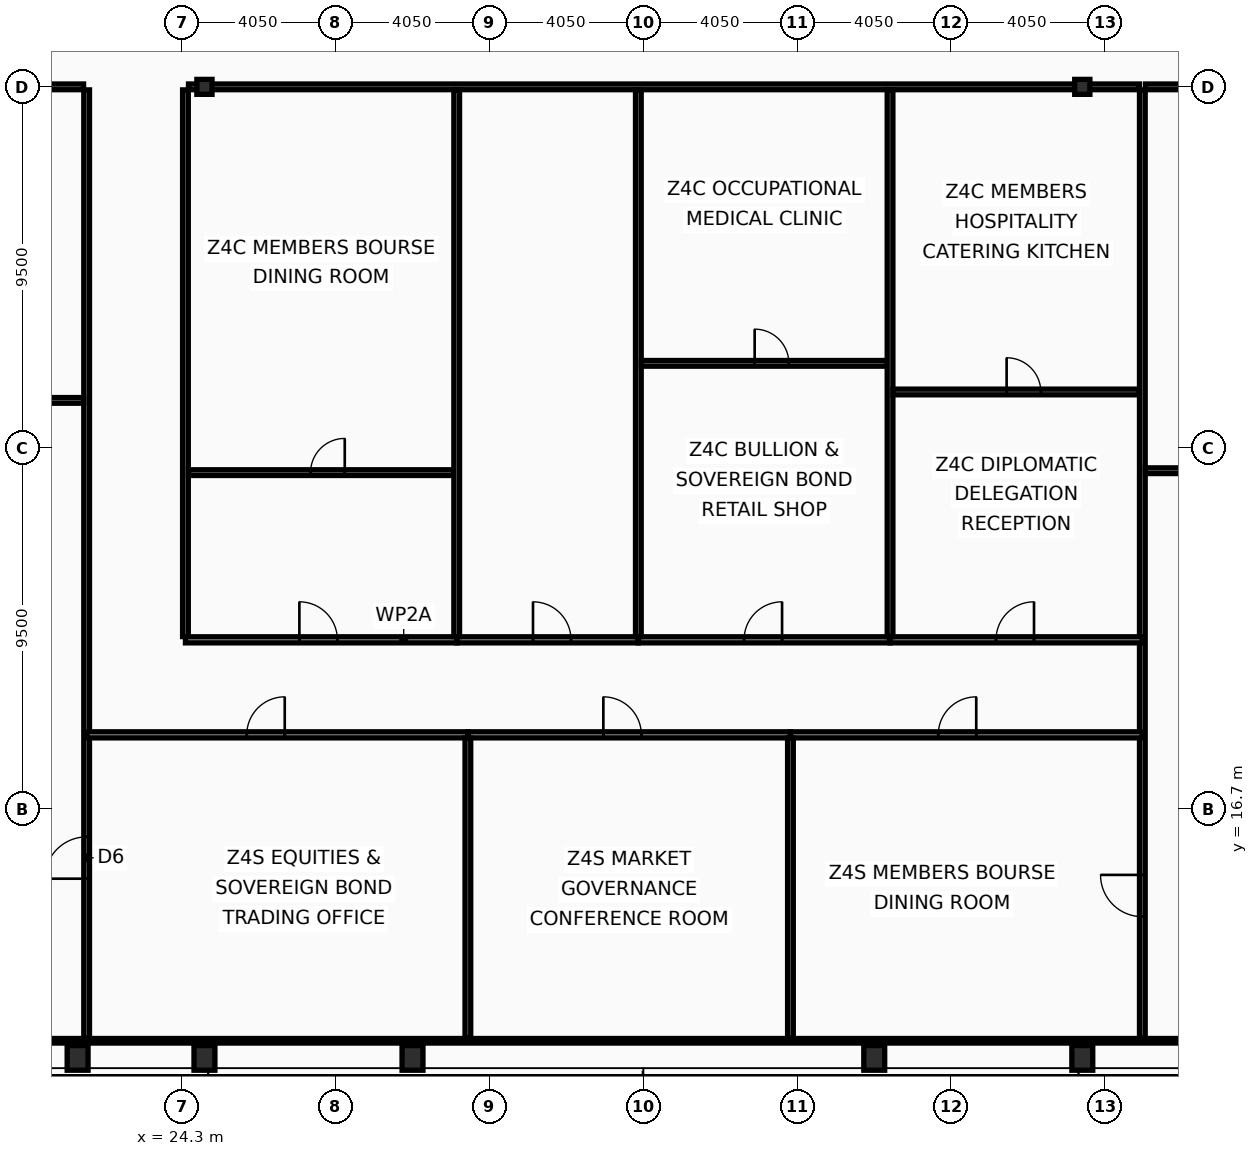
"""IFC4 building model, lengths in metres.
Left out: names, types, materials, properties, quantities, classifications, styles, units other than length and angle.
Written with IfcOpenShell. Run it as: python <this file> out.ifc"""

import sys

from ifc_helpers import new_model, si_unit, direction, frame, frame_2d, origin, origin_2d, place, context, subcontext, project, spatial, rectangle, hollow_rectangle, i_section, extrude, element, fill, save


model = new_model("IFC4")
c1 = context("Model", 3, precision=1e-05, world=origin(), true_north=direction((0.0, 1.0)))
c2 = subcontext(c1, "Body", "Model", "MODEL_VIEW")
j1 = project(units=[si_unit("LENGTHUNIT", "METRE"), si_unit("PLANEANGLEUNIT", "RADIAN")], contexts=[c1])
p1 = place(None, origin())
s1 = spatial("IfcSite", under=j1, at=p1, CompositionType="ELEMENT")
p2 = place(p1, origin())
s2 = spatial("IfcBuilding", under=s1, at=p2, CompositionType="ELEMENT")
p3 = place(p2, frame((0.0, 0.0, 295.0)))
s3 = spatial("IfcBuildingStorey", under=s2, at=p3, CompositionType="ELEMENT", Elevation=295.0)
for number, where, z_axis, x_axis in (
    (1, (21.562, 10.15, 0.0), (0.0, 0.0, 1.0), (1.0, 0.0, 0.0)),
    (2, (24.9, 10.15, 0.0), (0.0, 0.0, 1.0), (1.0, 0.0, 0.0)),
    (3, (30.375, 10.15, 0.0), (0.0, 0.0, 1.0), (1.0, 0.0, 0.0)),
    (4, (42.525, 10.15, 0.0), (0.0, 0.0, 1.0), (1.0, 0.0, 0.0)),
    (5, (48.0, 10.15, 0.0), (0.0, 0.0, 1.0), (1.0, 0.0, 0.0)),
):
    element("IfcColumn", number, at=place(p3, frame(where, z_axis=z_axis, x_axis=x_axis)), inside=s3, PredefinedType="COLUMN", context=c2, shape_type="SweptSolid", body=[
        extrude(hollow_rectangle(XDim=0.55, YDim=0.65, WallThickness=0.04, at=origin_2d()), origin(), (0.0, 0.0, 1.0), 3.6),
    ])
for number, where, z_axis, x_axis in (
    (6, (24.9, 35.7, 0.0), (0.0, 0.0, 1.0), (1.0, 0.0, 0.0)),
    (7, (48.0, 35.7, 0.0), (0.0, 0.0, 1.0), (1.0, 0.0, 0.0)),
):
    element("IfcColumn", number, at=place(p3, frame(where, z_axis=z_axis, x_axis=x_axis)), inside=s3, PredefinedType="COLUMN", context=c2, shape_type="SweptSolid", body=[
        extrude(i_section(OverallWidth=0.399, OverallDepth=0.393, WebThickness=0.023, FlangeThickness=0.037, at=origin_2d()), origin(), (0.0, 0.0, 1.0), 3.6),
    ])
p4 = place(p3, frame((21.8, 10.665, 0.0), z_axis=(0.0, 0.0, 1.0), x_axis=(0.0, 1.0, 0.0)))
e8 = element("IfcWall", 8, at=p4, inside=s3, PredefinedType="PARTITIONING", context=c2, shape_type="SweptSolid", body=[
    extrude(rectangle(XDim=24.955, YDim=0.15, at=frame_2d((12.478, 0.0))), origin(), (0.0, 0.0, 1.0), 3.03),
])
p5 = place(p4, frame((4.2, 0.0, 0.0)))
e9 = element("IfcOpeningElement", 9, at=p5, cuts=e8, PredefinedType="OPENING", context=c2, shape_type="SweptSolid", body=[
    extrude(rectangle(XDim=1.1, YDim=2.1, at=frame_2d((0.55, 1.05))), frame((0.0, 0.085, 0.0), z_axis=(0.0, -1.0, 0.0), x_axis=(1.0, 0.0, 0.0)), (0.0, 0.0, 1.0), 0.17),
])
p6 = place(p3, frame((12.095, 35.7, 0.0), z_axis=(0.0, 0.0, 1.0), x_axis=(1.0, 0.0, 0.0)))
e10 = element("IfcWall", 10, at=p6, inside=s3, PredefinedType="PARTITIONING", context=c2, shape_type="SweptSolid", body=[
    extrude(rectangle(XDim=9.625, YDim=0.15, at=frame_2d((4.812, 0.0))), origin(), (0.0, 0.0, 1.0), 2.78),
])
p7 = place(p6, frame((2.8, 0.0, 0.0)))
e11 = element("IfcOpeningElement", 11, at=p7, cuts=e10, PredefinedType="OPENING", context=c2, shape_type="SweptSolid", body=[
    extrude(rectangle(XDim=1.0, YDim=2.05, at=frame_2d((0.5, 1.025))), frame((0.0, 0.085, 0.0), z_axis=(0.0, -1.0, 0.0), x_axis=(1.0, 0.0, 0.0)), (0.0, 0.0, 1.0), 0.17),
])
p8 = place(p3, frame((12.095, 27.45, 0.0), z_axis=(0.0, 0.0, 1.0), x_axis=(1.0, 0.0, 0.0)))
e12 = element("IfcWall", 12, at=p8, inside=s3, PredefinedType="PARTITIONING", context=c2, shape_type="SweptSolid", body=[
    extrude(rectangle(XDim=9.625, YDim=0.15, at=frame_2d((4.812, 0.0))), origin(), (0.0, 0.0, 1.0), 2.78),
])
p9 = place(p8, frame((2.2, 0.0, 0.0)))
e13 = element("IfcOpeningElement", 13, at=p9, cuts=e12, PredefinedType="OPENING", context=c2, shape_type="SweptSolid", body=[
    extrude(rectangle(XDim=0.9, YDim=2.05, at=frame_2d((0.45, 1.025))), frame((0.0, 0.085, 0.0), z_axis=(0.0, -1.0, 0.0), x_axis=(1.0, 0.0, 0.0)), (0.0, 0.0, 1.0), 0.17),
])
p10 = place(p3, frame((24.4, 21.235, 0.0), z_axis=(0.0, 0.0, 1.0), x_axis=(0.0, 1.0, 0.0)))
e14 = element("IfcWall", 14, at=p10, inside=s3, PredefinedType="PARTITIONING", context=c2, shape_type="SweptSolid", body=[
    extrude(rectangle(XDim=14.385, YDim=0.15, at=frame_2d((7.192, 0.0))), origin(), (0.0, 0.0, 1.0), 2.78),
])
p11 = place(p3, frame((49.58, 10.665, 0.0), z_axis=(0.0, 0.0, 1.0), x_axis=(0.0, 1.0, 0.0)))
e15 = element("IfcWall", 15, at=p11, inside=s3, PredefinedType="PARTITIONING", context=c2, shape_type="SweptSolid", body=[
    extrude(rectangle(XDim=24.955, YDim=0.15, at=frame_2d((12.478, 0.0))), origin(), (0.0, 0.0, 1.0), 3.03),
])
p12 = place(p11, frame((3.2, 0.0, 0.0)))
e16 = element("IfcOpeningElement", 16, at=p12, cuts=e15, PredefinedType="OPENING", context=c2, shape_type="SweptSolid", body=[
    extrude(rectangle(XDim=1.1, YDim=2.1, at=frame_2d((0.55, 1.05))), frame((0.0, 0.085, 0.0), z_axis=(0.0, -1.0, 0.0), x_axis=(1.0, 0.0, 0.0)), (0.0, 0.0, 1.0), 0.17),
])
p13 = place(p3, frame((24.48, 35.7, 0.0), z_axis=(0.0, 0.0, 1.0), x_axis=(1.0, 0.0, 0.0)))
e17 = element("IfcWall", 17, at=p13, inside=s3, PredefinedType="PARTITIONING", context=c2, shape_type="SweptSolid", body=[
    extrude(rectangle(XDim=25.02, YDim=0.15, at=frame_2d((12.51, 0.0))), origin(), (0.0, 0.0, 1.0), 2.78),
])
p14 = place(p3, frame((49.66, 35.7, 0.0), z_axis=(0.0, 0.0, 1.0), x_axis=(1.0, 0.0, 0.0)))
e18 = element("IfcWall", 18, at=p14, inside=s3, PredefinedType="PARTITIONING", context=c2, shape_type="SweptSolid", body=[
    extrude(rectangle(XDim=11.145, YDim=0.15, at=frame_2d((5.573, 0.0))), origin(), (0.0, 0.0, 1.0), 2.78),
])
p15 = place(p14, frame((2.2, 0.0, 0.0)))
e19 = element("IfcOpeningElement", 19, at=p15, cuts=e18, PredefinedType="OPENING", context=c2, shape_type="SweptSolid", body=[
    extrude(rectangle(XDim=1.0, YDim=2.05, at=frame_2d((0.5, 1.025))), frame((0.0, 0.085, 0.0), z_axis=(0.0, -1.0, 0.0), x_axis=(1.0, 0.0, 0.0)), (0.0, 0.0, 1.0), 0.17),
])
p16 = place(p3, frame((49.66, 25.6, 0.0), z_axis=(0.0, 0.0, 1.0), x_axis=(1.0, 0.0, 0.0)))
e20 = element("IfcWall", 20, at=p16, inside=s3, PredefinedType="PARTITIONING", context=c2, shape_type="SweptSolid", body=[
    extrude(rectangle(XDim=11.145, YDim=0.15, at=frame_2d((5.573, 0.0))), origin(), (0.0, 0.0, 1.0), 2.78),
])
p17 = place(p16, frame((2.2, 0.0, 0.0)))
e21 = element("IfcOpeningElement", 21, at=p17, cuts=e20, PredefinedType="OPENING", context=c2, shape_type="SweptSolid", body=[
    extrude(rectangle(XDim=0.9, YDim=2.05, at=frame_2d((0.45, 1.025))), frame((0.0, 0.085, 0.0), z_axis=(0.0, -1.0, 0.0), x_axis=(1.0, 0.0, 0.0)), (0.0, 0.0, 1.0), 0.17),
])
p18 = place(p3, frame((24.4, 21.15, 0.0), z_axis=(0.0, 0.0, 1.0), x_axis=(1.0, 0.0, 0.0)))
e22 = element("IfcWall", 22, at=p18, inside=s3, PredefinedType="PARTITIONING", context=c2, shape_type="SweptSolid", body=[
    extrude(rectangle(XDim=7.138, YDim=0.16, at=frame_2d((3.569, 0.0))), origin(), (0.0, 0.0, 1.0), 2.78),
])
p19 = place(p18, frame((2.998, 0.0, 0.0)))
e23 = element("IfcOpeningElement", 23, at=p19, cuts=e22, PredefinedType="OPENING", context=c2, shape_type="SweptSolid", body=[
    extrude(rectangle(XDim=1.0, YDim=2.05, at=frame_2d((0.5, 1.025))), frame((0.0, 0.09, 0.0), z_axis=(0.0, -1.0, 0.0), x_axis=(1.0, 0.0, 0.0)), (0.0, 0.0, 1.0), 0.18),
])
p20 = place(p3, frame((24.48, 25.55, 0.0), z_axis=(0.0, 0.0, 1.0), x_axis=(1.0, 0.0, 0.0)))
e24 = element("IfcWall", 24, at=p20, inside=s3, PredefinedType="PARTITIONING", context=c2, shape_type="SweptSolid", body=[
    extrude(rectangle(XDim=6.978, YDim=0.15, at=frame_2d((3.489, 0.0))), origin(), (0.0, 0.0, 1.0), 2.78),
])
p21 = place(p20, frame((3.212, 0.0, 0.0)))
e25 = element("IfcOpeningElement", 25, at=p21, cuts=e24, PredefinedType="OPENING", context=c2, shape_type="SweptSolid", body=[
    extrude(rectangle(XDim=0.9, YDim=2.05, at=frame_2d((0.45, 1.025))), frame((0.0, 0.085, 0.0), z_axis=(0.0, -1.0, 0.0), x_axis=(1.0, 0.0, 0.0)), (0.0, 0.0, 1.0), 0.17),
])
p22 = place(p3, frame((31.538, 21.15, 0.0), z_axis=(0.0, 0.0, 1.0), x_axis=(1.0, 0.0, 0.0)))
e26 = element("IfcWall", 26, at=p22, inside=s3, PredefinedType="PARTITIONING", context=c2, shape_type="SweptSolid", body=[
    extrude(rectangle(XDim=4.78, YDim=0.16, at=frame_2d((2.39, 0.0))), origin(), (0.0, 0.0, 1.0), 3.44),
])
p23 = place(p22, frame((2.008, 0.0, 0.0)))
e27 = element("IfcOpeningElement", 27, at=p23, cuts=e26, PredefinedType="OPENING", context=c2, shape_type="SweptSolid", body=[
    extrude(rectangle(XDim=1.0, YDim=2.05, at=frame_2d((0.5, 1.025))), frame((0.0, 0.09, 0.0), z_axis=(0.0, -1.0, 0.0), x_axis=(1.0, 0.0, 0.0)), (0.0, 0.0, 1.0), 0.18),
])
p24 = place(p3, frame((31.538, 21.235, 0.0), z_axis=(0.0, 0.0, 1.0), x_axis=(0.0, 1.0, 0.0)))
e28 = element("IfcWall", 28, at=p24, inside=s3, PredefinedType="PARTITIONING", context=c2, shape_type="SweptSolid", body=[
    extrude(rectangle(XDim=14.385, YDim=0.15, at=frame_2d((7.192, 0.0))), origin(), (0.0, 0.0, 1.0), 3.03),
])
p25 = place(p3, frame((36.318, 21.15, 0.0), z_axis=(0.0, 0.0, 1.0), x_axis=(1.0, 0.0, 0.0)))
e29 = element("IfcWall", 29, at=p25, inside=s3, PredefinedType="PARTITIONING", context=c2, shape_type="SweptSolid", body=[
    extrude(rectangle(XDim=6.623, YDim=0.16, at=frame_2d((3.312, 0.0))), origin(), (0.0, 0.0, 1.0), 2.78),
])
p26 = place(p25, frame((2.782, 0.0, 0.0)))
e30 = element("IfcOpeningElement", 30, at=p26, cuts=e29, PredefinedType="OPENING", context=c2, shape_type="SweptSolid", body=[
    extrude(rectangle(XDim=1.0, YDim=2.05, at=frame_2d((0.5, 1.025))), frame((0.0, 0.09, 0.0), z_axis=(0.0, -1.0, 0.0), x_axis=(1.0, 0.0, 0.0)), (0.0, 0.0, 1.0), 0.18),
])
p27 = place(p3, frame((36.318, 21.235, 0.0), z_axis=(0.0, 0.0, 1.0), x_axis=(0.0, 1.0, 0.0)))
e31 = element("IfcWall", 31, at=p27, inside=s3, PredefinedType="PARTITIONING", context=c2, shape_type="SweptSolid", body=[
    extrude(rectangle(XDim=14.385, YDim=0.15, at=frame_2d((7.192, 0.0))), origin(), (0.0, 0.0, 1.0), 3.03),
])
p28 = place(p3, frame((36.398, 28.425, 0.0), z_axis=(0.0, 0.0, 1.0), x_axis=(1.0, 0.0, 0.0)))
e32 = element("IfcWall", 32, at=p28, inside=s3, PredefinedType="PARTITIONING", context=c2, shape_type="SweptSolid", body=[
    extrude(rectangle(XDim=6.463, YDim=0.15, at=frame_2d((3.231, 0.0))), origin(), (0.0, 0.0, 1.0), 2.78),
])
p29 = place(p28, frame((2.98, 0.0, 0.0)))
e33 = element("IfcOpeningElement", 33, at=p29, cuts=e32, PredefinedType="OPENING", context=c2, shape_type="SweptSolid", body=[
    extrude(rectangle(XDim=0.9, YDim=2.05, at=frame_2d((0.45, 1.025))), frame((0.0, 0.085, 0.0), z_axis=(0.0, -1.0, 0.0), x_axis=(1.0, 0.0, 0.0)), (0.0, 0.0, 1.0), 0.17),
])
p30 = place(p3, frame((42.941, 21.15, 0.0), z_axis=(0.0, 0.0, 1.0), x_axis=(1.0, 0.0, 0.0)))
e34 = element("IfcWall", 34, at=p30, inside=s3, PredefinedType="PARTITIONING", context=c2, shape_type="SweptSolid", body=[
    extrude(rectangle(XDim=6.639, YDim=0.16, at=frame_2d((3.319, 0.0))), origin(), (0.0, 0.0, 1.0), 2.78),
])
p31 = place(p30, frame((2.788, 0.0, 0.0)))
e35 = element("IfcOpeningElement", 35, at=p31, cuts=e34, PredefinedType="OPENING", context=c2, shape_type="SweptSolid", body=[
    extrude(rectangle(XDim=1.0, YDim=2.05, at=frame_2d((0.5, 1.025))), frame((0.0, 0.09, 0.0), z_axis=(0.0, -1.0, 0.0), x_axis=(1.0, 0.0, 0.0)), (0.0, 0.0, 1.0), 0.18),
])
p32 = place(p3, frame((42.941, 21.235, 0.0), z_axis=(0.0, 0.0, 1.0), x_axis=(0.0, 1.0, 0.0)))
e36 = element("IfcWall", 36, at=p32, inside=s3, PredefinedType="PARTITIONING", context=c2, shape_type="SweptSolid", body=[
    extrude(rectangle(XDim=14.385, YDim=0.15, at=frame_2d((7.192, 0.0))), origin(), (0.0, 0.0, 1.0), 2.78),
])
p33 = place(p3, frame((43.021, 27.672, 0.0), z_axis=(0.0, 0.0, 1.0), x_axis=(1.0, 0.0, 0.0)))
e37 = element("IfcWall", 37, at=p33, inside=s3, PredefinedType="PARTITIONING", context=c2, shape_type="SweptSolid", body=[
    extrude(rectangle(XDim=6.479, YDim=0.15, at=frame_2d((3.24, 0.0))), origin(), (0.0, 0.0, 1.0), 2.78),
])
p34 = place(p33, frame((2.988, 0.0, 0.0)))
e38 = element("IfcOpeningElement", 38, at=p34, cuts=e37, PredefinedType="OPENING", context=c2, shape_type="SweptSolid", body=[
    extrude(rectangle(XDim=0.9, YDim=2.05, at=frame_2d((0.45, 1.025))), frame((0.0, 0.085, 0.0), z_axis=(0.0, -1.0, 0.0), x_axis=(1.0, 0.0, 0.0)), (0.0, 0.0, 1.0), 0.17),
])
p35 = place(p3, frame((21.8, 18.65, 0.0), z_axis=(0.0, 0.0, 1.0), x_axis=(1.0, 0.0, 0.0)))
e39 = element("IfcWall", 39, at=p35, inside=s3, PredefinedType="PARTITIONING", context=c2, shape_type="SweptSolid", body=[
    extrude(rectangle(XDim=10.032, YDim=0.16, at=frame_2d((5.016, 0.0))), origin(), (0.0, 0.0, 1.0), 2.78),
])
p36 = place(p35, frame((4.213, 0.0, 0.0)))
e40 = element("IfcOpeningElement", 40, at=p36, cuts=e39, PredefinedType="OPENING", context=c2, shape_type="SweptSolid", body=[
    extrude(rectangle(XDim=1.0, YDim=2.05, at=frame_2d((0.5, 1.025))), frame((0.0, 0.09, 0.0), z_axis=(0.0, -1.0, 0.0), x_axis=(1.0, 0.0, 0.0)), (0.0, 0.0, 1.0), 0.18),
])
p37 = place(p3, frame((31.832, 18.65, 0.0), z_axis=(0.0, 0.0, 1.0), x_axis=(1.0, 0.0, 0.0)))
e41 = element("IfcWall", 41, at=p37, inside=s3, PredefinedType="PARTITIONING", context=c2, shape_type="SweptSolid", body=[
    extrude(rectangle(XDim=8.488, YDim=0.16, at=frame_2d((4.244, 0.0))), origin(), (0.0, 0.0, 1.0), 3.44),
])
p38 = place(p37, frame((3.565, 0.0, 0.0)))
e42 = element("IfcOpeningElement", 42, at=p38, cuts=e41, PredefinedType="OPENING", context=c2, shape_type="SweptSolid", body=[
    extrude(rectangle(XDim=1.0, YDim=2.05, at=frame_2d((0.5, 1.025))), frame((0.0, 0.09, 0.0), z_axis=(0.0, -1.0, 0.0), x_axis=(1.0, 0.0, 0.0)), (0.0, 0.0, 1.0), 0.18),
])
p39 = place(p3, frame((31.832, 10.665, 0.0), z_axis=(0.0, 0.0, 1.0), x_axis=(0.0, 1.0, 0.0)))
e43 = element("IfcWall", 43, at=p39, inside=s3, PredefinedType="PARTITIONING", context=c2, shape_type="SweptSolid", body=[
    extrude(rectangle(XDim=7.9, YDim=0.15, at=frame_2d((3.95, 0.0))), origin(), (0.0, 0.0, 1.0), 3.03),
])
p40 = place(p3, frame((40.32, 18.65, 0.0), z_axis=(0.0, 0.0, 1.0), x_axis=(1.0, 0.0, 0.0)))
e44 = element("IfcWall", 44, at=p40, inside=s3, PredefinedType="PARTITIONING", context=c2, shape_type="SweptSolid", body=[
    extrude(rectangle(XDim=9.26, YDim=0.16, at=frame_2d((4.63, 0.0))), origin(), (0.0, 0.0, 1.0), 2.78),
])
p41 = place(p40, frame((3.889, 0.0, 0.0)))
e45 = element("IfcOpeningElement", 45, at=p41, cuts=e44, PredefinedType="OPENING", context=c2, shape_type="SweptSolid", body=[
    extrude(rectangle(XDim=1.0, YDim=2.05, at=frame_2d((0.5, 1.025))), frame((0.0, 0.09, 0.0), z_axis=(0.0, -1.0, 0.0), x_axis=(1.0, 0.0, 0.0)), (0.0, 0.0, 1.0), 0.18),
])
p42 = place(p3, frame((40.32, 10.665, 0.0), z_axis=(0.0, 0.0, 1.0), x_axis=(0.0, 1.0, 0.0)))
e46 = element("IfcWall", 46, at=p42, inside=s3, PredefinedType="PARTITIONING", context=c2, shape_type="SweptSolid", body=[
    extrude(rectangle(XDim=7.9, YDim=0.15, at=frame_2d((3.95, 0.0))), origin(), (0.0, 0.0, 1.0), 3.03),
])
p43 = place(p3, frame((12.095, 10.6, 0.0), z_axis=(0.0, 0.0, 1.0), x_axis=(1.0, 0.0, 0.0)))
e47 = element("IfcWall", 47, at=p43, inside=s3, PredefinedType="PARTITIONING", context=c2, shape_type="SweptSolid", body=[
    extrude(rectangle(XDim=48.71, YDim=0.12, at=frame_2d((24.355, 0.0))), origin(), (0.0, 0.0, 1.0), 2.78),
])
p44 = place(p5, origin())
e48 = element("IfcDoor", 48, at=p44, inside=s3, OperationType="SINGLE_SWING_LEFT", PredefinedType="DOOR", context=c2, shape_type="SweptSolid", body=[
    extrude(rectangle(XDim=1.1, YDim=2.1, at=frame_2d((0.55, 1.05))), frame((0.0, 0.025, 0.0), z_axis=(0.0, -1.0, 0.0), x_axis=(1.0, 0.0, 0.0)), (0.0, 0.0, 1.0), 0.05),
])
fill(e9, e48)
p45 = place(p12, origin())
e49 = element("IfcDoor", 49, at=p45, inside=s3, OperationType="SINGLE_SWING_RIGHT", PredefinedType="DOOR", context=c2, shape_type="SweptSolid", body=[
    extrude(rectangle(XDim=1.1, YDim=2.1, at=frame_2d((0.55, 1.05))), frame((0.0, 0.025, 0.0), z_axis=(0.0, -1.0, 0.0), x_axis=(1.0, 0.0, 0.0)), (0.0, 0.0, 1.0), 0.05),
])
fill(e16, e49)
p46 = place(p19, origin())
e50 = element("IfcDoor", 50, at=p46, inside=s3, OperationType="SINGLE_SWING_LEFT", PredefinedType="DOOR", context=c2, shape_type="SweptSolid", body=[
    extrude(rectangle(XDim=1.0, YDim=2.05, at=frame_2d((0.5, 1.025))), frame((0.0, 0.025, 0.0), z_axis=(0.0, -1.0, 0.0), x_axis=(1.0, 0.0, 0.0)), (0.0, 0.0, 1.0), 0.05),
])
fill(e23, e50)
p47 = place(p21, origin())
e51 = element("IfcDoor", 51, at=p47, inside=s3, OperationType="SINGLE_SWING_RIGHT", PredefinedType="DOOR", context=c2, shape_type="SweptSolid", body=[
    extrude(rectangle(XDim=0.9, YDim=2.05, at=frame_2d((0.45, 1.025))), frame((0.0, 0.025, 0.0), z_axis=(0.0, -1.0, 0.0), x_axis=(1.0, 0.0, 0.0)), (0.0, 0.0, 1.0), 0.05),
])
fill(e25, e51)
p48 = place(p23, origin())
e52 = element("IfcDoor", 52, at=p48, inside=s3, OperationType="SINGLE_SWING_LEFT", PredefinedType="DOOR", context=c2, shape_type="SweptSolid", body=[
    extrude(rectangle(XDim=1.0, YDim=2.05, at=frame_2d((0.5, 1.025))), frame((0.0, 0.025, 0.0), z_axis=(0.0, -1.0, 0.0), x_axis=(1.0, 0.0, 0.0)), (0.0, 0.0, 1.0), 0.05),
])
fill(e27, e52)
p49 = place(p26, origin())
e53 = element("IfcDoor", 53, at=p49, inside=s3, OperationType="SINGLE_SWING_RIGHT", PredefinedType="DOOR", context=c2, shape_type="SweptSolid", body=[
    extrude(rectangle(XDim=1.0, YDim=2.05, at=frame_2d((0.5, 1.025))), frame((0.0, 0.025, 0.0), z_axis=(0.0, -1.0, 0.0), x_axis=(1.0, 0.0, 0.0)), (0.0, 0.0, 1.0), 0.05),
])
fill(e30, e53)
p50 = place(p29, origin())
e54 = element("IfcDoor", 54, at=p50, inside=s3, OperationType="SINGLE_SWING_LEFT", PredefinedType="DOOR", context=c2, shape_type="SweptSolid", body=[
    extrude(rectangle(XDim=0.9, YDim=2.05, at=frame_2d((0.45, 1.025))), frame((0.0, 0.025, 0.0), z_axis=(0.0, -1.0, 0.0), x_axis=(1.0, 0.0, 0.0)), (0.0, 0.0, 1.0), 0.05),
])
fill(e33, e54)
p51 = place(p31, origin())
e55 = element("IfcDoor", 55, at=p51, inside=s3, OperationType="SINGLE_SWING_RIGHT", PredefinedType="DOOR", context=c2, shape_type="SweptSolid", body=[
    extrude(rectangle(XDim=1.0, YDim=2.05, at=frame_2d((0.5, 1.025))), frame((0.0, 0.025, 0.0), z_axis=(0.0, -1.0, 0.0), x_axis=(1.0, 0.0, 0.0)), (0.0, 0.0, 1.0), 0.05),
])
fill(e35, e55)
p52 = place(p34, origin())
e56 = element("IfcDoor", 56, at=p52, inside=s3, OperationType="SINGLE_SWING_LEFT", PredefinedType="DOOR", context=c2, shape_type="SweptSolid", body=[
    extrude(rectangle(XDim=0.9, YDim=2.05, at=frame_2d((0.45, 1.025))), frame((0.0, 0.025, 0.0), z_axis=(0.0, -1.0, 0.0), x_axis=(1.0, 0.0, 0.0)), (0.0, 0.0, 1.0), 0.05),
])
fill(e38, e56)
p53 = place(p36, origin())
e57 = element("IfcDoor", 57, at=p53, inside=s3, OperationType="SINGLE_SWING_RIGHT", PredefinedType="DOOR", context=c2, shape_type="SweptSolid", body=[
    extrude(rectangle(XDim=1.0, YDim=2.05, at=frame_2d((0.5, 1.025))), frame((0.0, 0.025, 0.0), z_axis=(0.0, -1.0, 0.0), x_axis=(1.0, 0.0, 0.0)), (0.0, 0.0, 1.0), 0.05),
])
fill(e40, e57)
p54 = place(p38, origin())
e58 = element("IfcDoor", 58, at=p54, inside=s3, OperationType="SINGLE_SWING_LEFT", PredefinedType="DOOR", context=c2, shape_type="SweptSolid", body=[
    extrude(rectangle(XDim=1.0, YDim=2.05, at=frame_2d((0.5, 1.025))), frame((0.0, 0.025, 0.0), z_axis=(0.0, -1.0, 0.0), x_axis=(1.0, 0.0, 0.0)), (0.0, 0.0, 1.0), 0.05),
])
fill(e42, e58)
p55 = place(p41, origin())
e59 = element("IfcDoor", 59, at=p55, inside=s3, OperationType="SINGLE_SWING_RIGHT", PredefinedType="DOOR", context=c2, shape_type="SweptSolid", body=[
    extrude(rectangle(XDim=1.0, YDim=2.05, at=frame_2d((0.5, 1.025))), frame((0.0, 0.025, 0.0), z_axis=(0.0, -1.0, 0.0), x_axis=(1.0, 0.0, 0.0)), (0.0, 0.0, 1.0), 0.05),
])
fill(e45, e59)
save(model, sys.argv[1])
